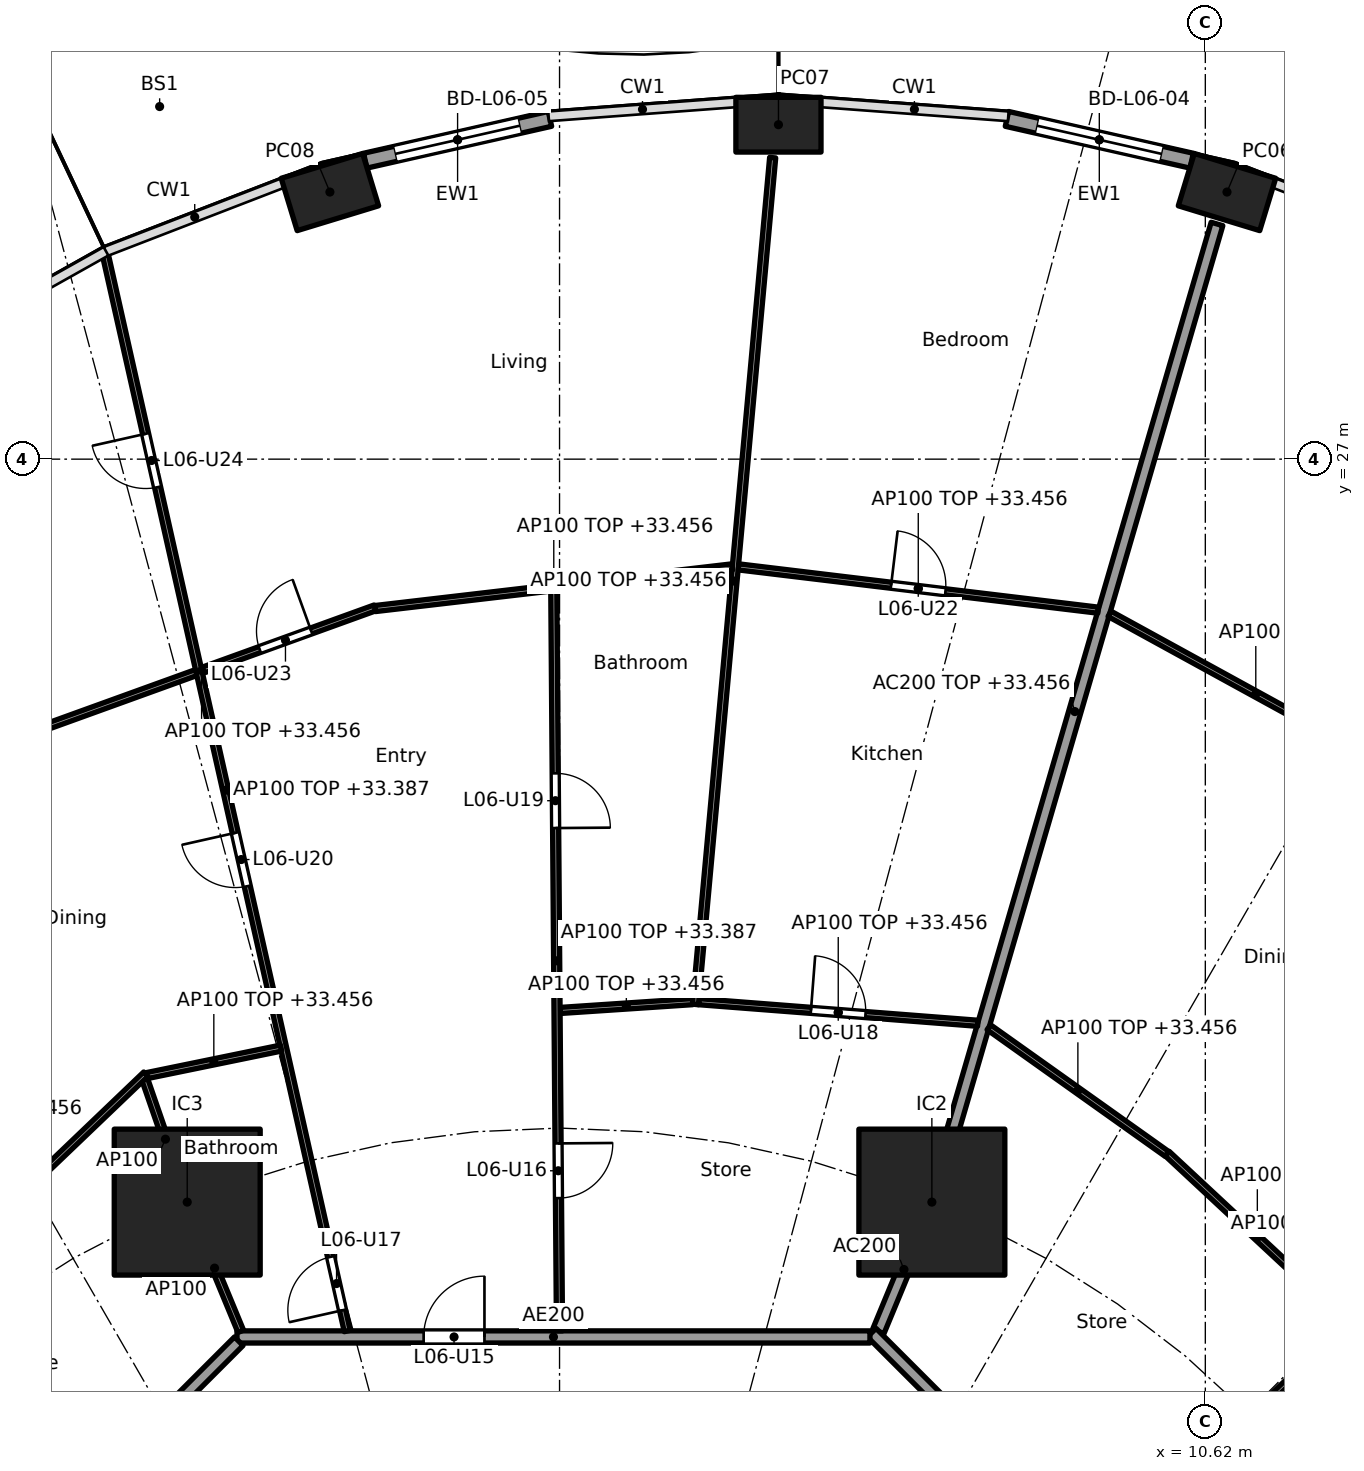
"""IFC4 building model, lengths in metres.
Left out: names, types, materials, properties, quantities, classifications, styles, units other than length and angle.
Written with IfcOpenShell. Run it as: python <this file> out.ifc"""

import sys

from ifc_helpers import new_model, si_unit, direction, frame, frame_2d, origin, origin_2d, place, context, subcontext, project, spatial, rectangle, hollow_rectangle, extrude, element, fill, save


model = new_model("IFC4")
c1 = context("Model", 3, precision=1e-05, world=origin(), true_north=direction((0.0, 1.0)))
c2 = subcontext(c1, "Body", "Model", "MODEL_VIEW")
j1 = project(units=[si_unit("LENGTHUNIT", "METRE"), si_unit("PLANEANGLEUNIT", "RADIAN")], contexts=[c1])
p1 = place(None, origin())
s1 = spatial("IfcSite", under=j1, at=p1, CompositionType="ELEMENT")
p2 = place(p1, origin())
s2 = spatial("IfcBuilding", under=s1, at=p2, CompositionType="ELEMENT")
p3 = place(p2, frame((0.0, 0.0, 30.7)))
s3 = spatial("IfcBuildingStorey", under=s2, at=p3, CompositionType="ELEMENT", Elevation=30.7)
for number, where, z_axis, x_axis in (
    (1, (10.976, 31.393, 0.0), (0.0, 0.0, 1.0), (-0.957, 0.292, 0.0)),
    (2, (3.6, 32.5, 0.0), (0.0, 0.0, 1.0), (-1.0, 0.0, 0.0)),
    (3, (-3.776, 31.393, 0.0), (0.0, 0.0, 1.0), (-0.957, -0.292, 0.0)),
):
    element("IfcColumn", number, at=place(p3, frame(where, z_axis=z_axis, x_axis=x_axis)), inside=s3, PredefinedType="COLUMN", context=c2, shape_type="SweptSolid", body=[
        extrude(hollow_rectangle(XDim=1.4, YDim=0.9, WallThickness=0.05, at=origin_2d()), origin(), (0.0, 0.0, 1.0), 3.7),
    ])
for number, where, z_axis, x_axis in (
    (4, (6.123, 14.782, 0.0), (0.0, 0.0, 1.0), (1.0, 0.0, 0.0)),
    (5, (-6.123, 14.782, 0.0), (0.0, 0.0, 1.0), (1.0, 0.0, 0.0)),
):
    element("IfcColumn", number, at=place(p3, frame(where, z_axis=z_axis, x_axis=x_axis)), inside=s3, PredefinedType="COLUMN", context=c2, shape_type="SweptSolid", body=[
        extrude(rectangle(XDim=2.4, YDim=2.4, at=origin_2d()), origin(), (0.0, 0.0, 1.0), 3.7),
    ])
p4 = place(p3, frame((7.358, 32.596, 0.0), z_axis=(0.0, 0.0, 1.0), x_axis=(0.97533495413, -0.220729987208, 0.0)))
e6 = element("IfcWall", 6, at=p4, inside=s3, PredefinedType="SOLIDWALL", context=c2, shape_type="SweptSolid", body=[
    extrude(rectangle(XDim=3.115, YDim=0.25, at=frame_2d((1.557, 0.0))), origin(), (0.0, 0.0, 1.0), 3.44),
])
p5 = place(p4, frame((0.507, 0.0, 0.0)))
e7 = element("IfcOpeningElement", 7, at=p5, cuts=e6, PredefinedType="OPENING", context=c2, shape_type="SweptSolid", body=[
    extrude(rectangle(XDim=2.1, YDim=2.4, at=frame_2d((1.05, 1.2))), frame((0.0, 0.135, 0.0), z_axis=(0.0, -1.0, 0.0), x_axis=(1.0, 0.0, 0.0)), (0.0, 0.0, 1.0), 0.27),
])
p6 = place(p3, frame((-3.195, 31.908, 0.0), z_axis=(0.0, 0.0, 1.0), x_axis=(0.975331134677, 0.220746863466, 0.0)))
e8 = element("IfcWall", 8, at=p6, inside=s3, PredefinedType="SOLIDWALL", context=c2, shape_type="SweptSolid", body=[
    extrude(rectangle(XDim=3.115, YDim=0.25, at=frame_2d((1.557, 0.0))), origin(), (0.0, 0.0, 1.0), 3.44),
])
p7 = place(p6, frame((0.507, 0.0, 0.0)))
e9 = element("IfcOpeningElement", 9, at=p7, cuts=e8, PredefinedType="OPENING", context=c2, shape_type="SweptSolid", body=[
    extrude(rectangle(XDim=2.1, YDim=2.4, at=frame_2d((1.05, 1.2))), frame((0.0, 0.135, 0.0), z_axis=(0.0, -1.0, 0.0), x_axis=(1.0, 0.0, 0.0)), (0.0, 0.0, 1.0), 0.27),
])
p8 = place(p3, frame((5.243, 12.657, 0.0), z_axis=(0.0, 0.0, 1.0), x_axis=(0.382707856524, 0.923869415315, 0.0)))
e10 = element("IfcWall", 10, at=p8, inside=s3, PredefinedType="PARTITIONING", context=c2, shape_type="SweptSolid", body=[
    extrude(rectangle(XDim=2.2, YDim=0.2, at=frame_2d((1.1, 0.0))), origin(), (0.0, 0.0, 1.0), 3.44),
])
p9 = place(p3, frame((6.137, 14.83, 0.0), z_axis=(0.0, 0.0, 1.0), x_axis=(0.27985745069, 0.960041565399, 0.0)))
e11 = element("IfcWall", 11, at=p9, inside=s3, PredefinedType="PARTITIONING", context=c2, shape_type="SweptSolid", body=[
    extrude(rectangle(XDim=16.705, YDim=0.2, at=frame_2d((8.353, 0.0))), origin(), (0.0, 0.0, 1.0), 2.756),
])
p10 = place(p3, frame((12.635, 5.134, 0.0), z_axis=(0.0, 0.0, 1.0), x_axis=(-0.707106781187, 0.707106781187, 0.0)))
e12 = element("IfcWall", 12, at=p10, inside=s3, PredefinedType="PARTITIONING", context=c2, shape_type="SweptSolid", body=[
    extrude(rectangle(XDim=10.609, YDim=0.2, at=frame_2d((5.305, 0.0))), origin(), (0.0, 0.0, 1.0), 3.44),
])
p11 = place(p10, frame((3.503, 0.0, 0.0)))
e13 = element("IfcOpeningElement", 13, at=p11, cuts=e12, PredefinedType="OPENING", context=c2, shape_type="SweptSolid", body=[
    extrude(rectangle(XDim=1.0, YDim=2.1, at=frame_2d((0.5, 1.05))), frame((0.0, 0.11, 0.0), z_axis=(0.0, -1.0, 0.0), x_axis=(1.0, 0.0, 0.0)), (0.0, 0.0, 1.0), 0.22),
])
p12 = place(p3, frame((5.104, 12.565, 0.0), z_axis=(0.0, 0.0, 1.0), x_axis=(-1.0, 0.0, 0.0)))
e14 = element("IfcWall", 14, at=p12, inside=s3, PredefinedType="PARTITIONING", context=c2, shape_type="SweptSolid", body=[
    extrude(rectangle(XDim=10.409, YDim=0.2, at=frame_2d((5.205, 0.0))), origin(), (0.0, 0.0, 1.0), 3.44),
])
p13 = place(p12, frame((6.339, 0.0, 0.0)))
e15 = element("IfcOpeningElement", 15, at=p13, cuts=e14, PredefinedType="OPENING", context=c2, shape_type="SweptSolid", body=[
    extrude(rectangle(XDim=1.0, YDim=2.1, at=frame_2d((0.5, 1.05))), frame((0.0, 0.11, 0.0), z_axis=(0.0, -1.0, 0.0), x_axis=(1.0, 0.0, 0.0)), (0.0, 0.0, 1.0), 0.22),
])
p14 = place(p3, frame((-5.275, 12.494, 0.0), z_axis=(0.0, 0.0, 1.0), x_axis=(-0.707106781187, -0.707106781187, 0.0)))
e16 = element("IfcWall", 16, at=p14, inside=s3, PredefinedType="PARTITIONING", context=c2, shape_type="SweptSolid", body=[
    extrude(rectangle(XDim=10.209, YDim=0.2, at=frame_2d((5.104, 0.0))), origin(), (0.0, 0.0, 1.0), 3.44),
])
p15 = place(p3, frame((10.813, 7.091, 0.0), z_axis=(0.0, 0.0, 1.0), x_axis=(0.885182649479, 0.465243674928, 0.0)))
e17 = element("IfcWall", 17, at=p15, inside=s3, PredefinedType="PARTITIONING", context=c2, shape_type="SweptSolid", body=[
    extrude(rectangle(XDim=12.551, YDim=0.1, at=frame_2d((6.275, 0.0))), origin(), (0.0, 0.0, 1.0), 2.687),
])
p16 = place(p15, frame((0.539, 0.0, 0.0)))
e18 = element("IfcOpeningElement", 18, at=p16, cuts=e17, PredefinedType="OPENING", context=c2, shape_type="SweptSolid", body=[
    extrude(rectangle(XDim=0.9, YDim=2.1, at=frame_2d((0.45, 1.05))), frame((0.0, 0.06, 0.0), z_axis=(0.0, -1.0, 0.0), x_axis=(1.0, 0.0, 0.0)), (0.0, 0.0, 1.0), 0.12),
])
p17 = place(p15, frame((8.494, 0.0, 0.0)))
e19 = element("IfcOpeningElement", 19, at=p17, cuts=e17, PredefinedType="OPENING", context=c2, shape_type="SweptSolid", body=[
    extrude(rectangle(XDim=0.9, YDim=2.1, at=frame_2d((0.45, 1.05))), frame((0.0, 0.06, 0.0), z_axis=(0.0, -1.0, 0.0), x_axis=(1.0, 0.0, 0.0)), (0.0, 0.0, 1.0), 0.12),
])
p18 = place(p3, frame((8.957, 8.953, 0.0), z_axis=(0.0, 0.0, 1.0), x_axis=(0.725250022034, 0.688485588476, 0.0)))
e20 = element("IfcWall", 20, at=p18, inside=s3, PredefinedType="PARTITIONING", context=c2, shape_type="SweptSolid", body=[
    extrude(rectangle(XDim=12.963, YDim=0.1, at=frame_2d((6.481, 0.0))), origin(), (0.0, 0.0, 1.0), 2.687),
])
p19 = place(p18, frame((2.333, 0.0, 0.0)))
e21 = element("IfcOpeningElement", 21, at=p19, cuts=e20, PredefinedType="OPENING", context=c2, shape_type="SweptSolid", body=[
    extrude(rectangle(XDim=0.9, YDim=2.1, at=frame_2d((0.45, 1.05))), frame((0.0, 0.06, 0.0), z_axis=(0.0, -1.0, 0.0), x_axis=(1.0, 0.0, 0.0)), (0.0, 0.0, 1.0), 0.12),
])
p20 = place(p18, frame((8.79, 0.0, 0.0)))
e22 = element("IfcOpeningElement", 22, at=p20, cuts=e20, PredefinedType="OPENING", context=c2, shape_type="SweptSolid", body=[
    extrude(rectangle(XDim=0.9, YDim=2.1, at=frame_2d((0.45, 1.05))), frame((0.0, 0.06, 0.0), z_axis=(0.0, -1.0, 0.0), x_axis=(1.0, 0.0, 0.0)), (0.0, 0.0, 1.0), 0.12),
])
p21 = place(p3, frame((12.958, 12.82, 0.0), z_axis=(0.0, 0.0, 1.0), x_axis=(-0.732028724098, 0.681273768096, 0.0)))
e23 = element("IfcWall", 23, at=p21, inside=s3, PredefinedType="PARTITIONING", context=c2, shape_type="SweptSolid", body=[
    extrude(rectangle(XDim=4.05, YDim=0.1, at=frame_2d((2.025, 0.0))), origin(), (0.0, 0.0, 1.0), 2.756),
])
p22 = place(p3, frame((9.989, 15.574, 0.0), z_axis=(0.0, 0.0, 1.0), x_axis=(-0.81492039338, 0.57957290521, 0.0)))
e24 = element("IfcWall", 24, at=p22, inside=s3, PredefinedType="PARTITIONING", context=c2, shape_type="SweptSolid", body=[
    extrude(rectangle(XDim=3.594, YDim=0.1, at=frame_2d((1.797, 0.0))), origin(), (0.0, 0.0, 1.0), 2.756),
])
p23 = place(p3, frame((13.855, 21.818, 0.0), z_axis=(0.0, 0.0, 1.0), x_axis=(-0.876809987787, 0.480837025734, 0.0)))
e25 = element("IfcWall", 25, at=p23, inside=s3, PredefinedType="PARTITIONING", context=c2, shape_type="SweptSolid", body=[
    extrude(rectangle(XDim=5.486, YDim=0.1, at=frame_2d((2.743, 0.0))), origin(), (0.0, 0.0, 1.0), 2.756),
])
p24 = place(p3, frame((6.878, 17.723, 0.0), z_axis=(0.0, 0.0, 1.0), x_axis=(-0.99701850123, 0.077162868047, 0.0)))
e26 = element("IfcWall", 26, at=p24, inside=s3, PredefinedType="PARTITIONING", context=c2, shape_type="SweptSolid", body=[
    extrude(rectangle(XDim=4.604, YDim=0.1, at=frame_2d((2.302, 0.0))), origin(), (0.0, 0.0, 1.0), 2.756),
])
p25 = place(p24, frame((1.852, 0.0, 0.0)))
e27 = element("IfcOpeningElement", 27, at=p25, cuts=e26, PredefinedType="OPENING", context=c2, shape_type="SweptSolid", body=[
    extrude(rectangle(XDim=0.9, YDim=2.1, at=frame_2d((0.45, 1.05))), frame((0.0, 0.06, 0.0), z_axis=(0.0, -1.0, 0.0), x_axis=(1.0, 0.0, 0.0)), (0.0, 0.0, 1.0), 0.12),
])
p26 = place(p3, frame((8.858, 24.516, 0.0), z_axis=(0.0, 0.0, 1.0), x_axis=(-0.992834127896, 0.119500604542, 0.0)))
e28 = element("IfcWall", 28, at=p26, inside=s3, PredefinedType="PARTITIONING", context=c2, shape_type="SweptSolid", body=[
    extrude(rectangle(XDim=5.959, YDim=0.1, at=frame_2d((2.98, 0.0))), origin(), (0.0, 0.0, 1.0), 2.756),
])
p27 = place(p26, frame((2.53, 0.0, 0.0)))
e29 = element("IfcOpeningElement", 29, at=p27, cuts=e28, PredefinedType="OPENING", context=c2, shape_type="SweptSolid", body=[
    extrude(rectangle(XDim=0.9, YDim=2.1, at=frame_2d((0.45, 1.05))), frame((0.0, 0.06, 0.0), z_axis=(0.0, -1.0, 0.0), x_axis=(1.0, 0.0, 0.0)), (0.0, 0.0, 1.0), 0.12),
])
p28 = place(p3, frame((2.234, 18.032, 0.0), z_axis=(0.0, 0.0, 1.0), x_axis=(0.090891502968, 0.995860800859, 0.0)))
e30 = element("IfcWall", 30, at=p28, inside=s3, PredefinedType="PARTITIONING", context=c2, shape_type="SweptSolid", body=[
    extrude(rectangle(XDim=13.984, YDim=0.1, at=frame_2d((6.992, 0.0))), origin(), (0.0, 0.0, 1.0), 2.756),
])
p29 = place(p3, frame((2.188, 18.079, 0.0), z_axis=(0.0, 0.0, 1.0), x_axis=(-0.997794542617, -0.066378089183, 0.0)))
e31 = element("IfcWall", 31, at=p29, inside=s3, PredefinedType="PARTITIONING", context=c2, shape_type="SweptSolid", body=[
    extrude(rectangle(XDim=2.185, YDim=0.1, at=frame_2d((1.092, 0.0))), origin(), (0.0, 0.0, 1.0), 2.756),
])
p30 = place(p3, frame((2.842, 25.229, 0.0), z_axis=(0.0, 0.0, 1.0), x_axis=(-0.993255612046, -0.115945198862, 0.0)))
e32 = element("IfcWall", 32, at=p30, inside=s3, PredefinedType="PARTITIONING", context=c2, shape_type="SweptSolid", body=[
    extrude(rectangle(XDim=5.913, YDim=0.1, at=frame_2d((2.956, 0.0))), origin(), (0.0, 0.0, 1.0), 2.756),
])
p31 = place(p3, frame((-0.001, 12.665, 0.0), z_axis=(0.0, 0.0, 1.0), x_axis=(-0.007702417287, 0.999970335944, 0.0)))
e33 = element("IfcWall", 33, at=p31, inside=s3, PredefinedType="PARTITIONING", context=c2, shape_type="SweptSolid", body=[
    extrude(rectangle(XDim=12.171, YDim=0.1, at=frame_2d((6.086, 0.0))), origin(), (0.0, 0.0, 1.0), 2.687),
])
p32 = place(p31, frame((2.183, 0.0, 0.0)))
e34 = element("IfcOpeningElement", 34, at=p32, cuts=e33, PredefinedType="OPENING", context=c2, shape_type="SweptSolid", body=[
    extrude(rectangle(XDim=0.9, YDim=2.1, at=frame_2d((0.45, 1.05))), frame((0.0, 0.06, 0.0), z_axis=(0.0, -1.0, 0.0), x_axis=(1.0, 0.0, 0.0)), (0.0, 0.0, 1.0), 0.12),
])
p33 = place(p31, frame((8.269, 0.0, 0.0)))
e35 = element("IfcOpeningElement", 35, at=p33, cuts=e33, PredefinedType="OPENING", context=c2, shape_type="SweptSolid", body=[
    extrude(rectangle(XDim=0.9, YDim=2.1, at=frame_2d((0.45, 1.05))), frame((0.0, 0.06, 0.0), z_axis=(0.0, -1.0, 0.0), x_axis=(1.0, 0.0, 0.0)), (0.0, 0.0, 1.0), 0.12),
])
p34 = place(p3, frame((-3.034, 24.554, 0.0), z_axis=(0.0, 0.0, 1.0), x_axis=(-0.940401691072, -0.340065669288, 0.0)))
e36 = element("IfcWall", 36, at=p34, inside=s3, PredefinedType="PARTITIONING", context=c2, shape_type="SweptSolid", body=[
    extrude(rectangle(XDim=6.067, YDim=0.1, at=frame_2d((3.034, 0.0))), origin(), (0.0, 0.0, 1.0), 2.756),
])
p35 = place(p34, frame((1.117, 0.0, 0.0)))
e37 = element("IfcOpeningElement", 37, at=p35, cuts=e36, PredefinedType="OPENING", context=c2, shape_type="SweptSolid", body=[
    extrude(rectangle(XDim=0.9, YDim=2.1, at=frame_2d((0.45, 1.05))), frame((0.0, 0.06, 0.0), z_axis=(0.0, -1.0, 0.0), x_axis=(1.0, 0.0, 0.0)), (0.0, 0.0, 1.0), 0.12),
])
p36 = place(p3, frame((-3.492, 12.662, 0.0), z_axis=(0.0, 0.0, 1.0), x_axis=(-0.219268088006, 0.975664648115, 0.0)))
e38 = element("IfcWall", 38, at=p36, inside=s3, PredefinedType="PARTITIONING", context=c2, shape_type="SweptSolid", body=[
    extrude(rectangle(XDim=18.23, YDim=0.1, at=frame_2d((9.115, 0.0))), origin(), (0.0, 0.0, 1.0), 2.687),
])
p37 = place(p36, frame((0.35, 0.0, 0.0)))
e39 = element("IfcOpeningElement", 39, at=p37, cuts=e38, PredefinedType="OPENING", context=c2, shape_type="SweptSolid", body=[
    extrude(rectangle(XDim=0.9, YDim=2.1, at=frame_2d((0.45, 1.05))), frame((0.0, 0.06, 0.0), z_axis=(0.0, -1.0, 0.0), x_axis=(1.0, 0.0, 0.0)), (0.0, 0.0, 1.0), 0.12),
])
p38 = place(p36, frame((7.497, 0.0, 0.0)))
e40 = element("IfcOpeningElement", 40, at=p38, cuts=e38, PredefinedType="OPENING", context=c2, shape_type="SweptSolid", body=[
    extrude(rectangle(XDim=0.9, YDim=2.1, at=frame_2d((0.45, 1.05))), frame((0.0, 0.06, 0.0), z_axis=(0.0, -1.0, 0.0), x_axis=(1.0, 0.0, 0.0)), (0.0, 0.0, 1.0), 0.12),
])
p39 = place(p36, frame((14.223, 0.0, 0.0)))
e41 = element("IfcOpeningElement", 41, at=p39, cuts=e38, PredefinedType="OPENING", context=c2, shape_type="SweptSolid", body=[
    extrude(rectangle(XDim=0.9, YDim=2.1, at=frame_2d((0.45, 1.05))), frame((0.0, 0.06, 0.0), z_axis=(0.0, -1.0, 0.0), x_axis=(1.0, 0.0, 0.0)), (0.0, 0.0, 1.0), 0.12),
])
p40 = place(p3, frame((-4.58, 17.315, 0.0), z_axis=(0.0, 0.0, 1.0), x_axis=(-0.979581941859, -0.201045316246, 0.0)))
e42 = element("IfcWall", 42, at=p40, inside=s3, PredefinedType="PARTITIONING", context=c2, shape_type="SweptSolid", body=[
    extrude(rectangle(XDim=2.256, YDim=0.1, at=frame_2d((1.128, 0.0))), origin(), (0.0, 0.0, 1.0), 2.756),
])
p41 = place(p3, frame((-5.243, 12.657, 0.0), z_axis=(0.0, 0.0, 1.0), x_axis=(-0.382719158442, 0.923864733477, 0.0)))
e43 = element("IfcWall", 43, at=p41, inside=s3, PredefinedType="PARTITIONING", context=c2, shape_type="SweptSolid", body=[
    extrude(rectangle(XDim=2.25, YDim=0.1, at=frame_2d((1.125, 0.0))), origin(), (0.0, 0.0, 1.0), 3.44),
])
p42 = place(p3, frame((-6.139, 14.83, 0.0), z_axis=(0.0, 0.0, 1.0), x_axis=(-0.327246993321, 0.944938836837, 0.0)))
e44 = element("IfcWall", 44, at=p42, inside=s3, PredefinedType="PARTITIONING", context=c2, shape_type="SweptSolid", body=[
    extrude(rectangle(XDim=2.09, YDim=0.1, at=frame_2d((1.045, 0.0))), origin(), (0.0, 0.0, 1.0), 3.44),
])
p43 = place(p3, frame((-6.803, 16.886, 0.0), z_axis=(0.0, 0.0, 1.0), x_axis=(-0.722763212502, -0.69109575216, 0.0)))
e45 = element("IfcWall", 45, at=p43, inside=s3, PredefinedType="PARTITIONING", context=c2, shape_type="SweptSolid", body=[
    extrude(rectangle(XDim=4.587, YDim=0.1, at=frame_2d((2.293, 0.0))), origin(), (0.0, 0.0, 1.0), 2.756),
])
p44 = place(p43, frame((2.75, 0.0, 0.0)))
e46 = element("IfcOpeningElement", 46, at=p44, cuts=e45, PredefinedType="OPENING", context=c2, shape_type="SweptSolid", body=[
    extrude(rectangle(XDim=0.9, YDim=2.1, at=frame_2d((0.45, 1.05))), frame((0.0, 0.06, 0.0), z_axis=(0.0, -1.0, 0.0), x_axis=(1.0, 0.0, 0.0)), (0.0, 0.0, 1.0), 0.12),
])
p45 = place(p5, origin())
e47 = element("IfcDoor", 47, at=p45, inside=s3, OperationType="SLIDING_TO_LEFT", PredefinedType="DOOR", context=c2, shape_type="SweptSolid", body=[
    extrude(rectangle(XDim=2.1, YDim=2.4, at=frame_2d((1.05, 1.2))), frame((0.0, 0.025, 0.0), z_axis=(0.0, -1.0, 0.0), x_axis=(1.0, 0.0, 0.0)), (0.0, 0.0, 1.0), 0.05),
])
fill(e7, e47)
p46 = place(p7, origin())
e48 = element("IfcDoor", 48, at=p46, inside=s3, OperationType="SLIDING_TO_LEFT", PredefinedType="DOOR", context=c2, shape_type="SweptSolid", body=[
    extrude(rectangle(XDim=2.1, YDim=2.4, at=frame_2d((1.05, 1.2))), frame((0.0, 0.025, 0.0), z_axis=(0.0, -1.0, 0.0), x_axis=(1.0, 0.0, 0.0)), (0.0, 0.0, 1.0), 0.05),
])
fill(e9, e48)
p47 = place(p13, frame((1.0, 0.0, 0.0), x_axis=(-1.0, 0.0, 0.0)))
e49 = element("IfcDoor", 49, at=p47, inside=s3, OperationType="SINGLE_SWING_RIGHT", PredefinedType="DOOR", context=c2, shape_type="SweptSolid", body=[
    extrude(rectangle(XDim=1.0, YDim=2.1, at=frame_2d((0.5, 1.05))), frame((0.0, 0.025, 0.0), z_axis=(0.0, -1.0, 0.0), x_axis=(1.0, 0.0, 0.0)), (0.0, 0.0, 1.0), 0.05),
])
fill(e15, e49)
p48 = place(p32, frame((0.9, 0.0, 0.0), x_axis=(-1.0, 0.0, 0.0)))
e50 = element("IfcDoor", 50, at=p48, inside=s3, OperationType="SINGLE_SWING_LEFT", PredefinedType="DOOR", context=c2, shape_type="SweptSolid", body=[
    extrude(rectangle(XDim=0.9, YDim=2.1, at=frame_2d((0.45, 1.05))), frame((0.0, 0.025, 0.0), z_axis=(0.0, -1.0, 0.0), x_axis=(1.0, 0.0, 0.0)), (0.0, 0.0, 1.0), 0.05),
])
fill(e34, e50)
p49 = place(p37, origin())
e51 = element("IfcDoor", 51, at=p49, inside=s3, OperationType="SINGLE_SWING_LEFT", PredefinedType="DOOR", context=c2, shape_type="SweptSolid", body=[
    extrude(rectangle(XDim=0.9, YDim=2.1, at=frame_2d((0.45, 1.05))), frame((0.0, 0.025, 0.0), z_axis=(0.0, -1.0, 0.0), x_axis=(1.0, 0.0, 0.0)), (0.0, 0.0, 1.0), 0.05),
])
fill(e39, e51)
p50 = place(p25, frame((0.9, 0.0, 0.0), x_axis=(-1.0, 0.0, 0.0)))
e52 = element("IfcDoor", 52, at=p50, inside=s3, OperationType="SINGLE_SWING_LEFT", PredefinedType="DOOR", context=c2, shape_type="SweptSolid", body=[
    extrude(rectangle(XDim=0.9, YDim=2.1, at=frame_2d((0.45, 1.05))), frame((0.0, 0.025, 0.0), z_axis=(0.0, -1.0, 0.0), x_axis=(1.0, 0.0, 0.0)), (0.0, 0.0, 1.0), 0.05),
])
fill(e27, e52)
p51 = place(p33, frame((0.9, 0.0, 0.0), x_axis=(-1.0, 0.0, 0.0)))
e53 = element("IfcDoor", 53, at=p51, inside=s3, OperationType="SINGLE_SWING_RIGHT", PredefinedType="DOOR", context=c2, shape_type="SweptSolid", body=[
    extrude(rectangle(XDim=0.9, YDim=2.1, at=frame_2d((0.45, 1.05))), frame((0.0, 0.025, 0.0), z_axis=(0.0, -1.0, 0.0), x_axis=(1.0, 0.0, 0.0)), (0.0, 0.0, 1.0), 0.05),
])
fill(e35, e53)
p52 = place(p38, origin())
e54 = element("IfcDoor", 54, at=p52, inside=s3, OperationType="SINGLE_SWING_RIGHT", PredefinedType="DOOR", context=c2, shape_type="SweptSolid", body=[
    extrude(rectangle(XDim=0.9, YDim=2.1, at=frame_2d((0.45, 1.05))), frame((0.0, 0.025, 0.0), z_axis=(0.0, -1.0, 0.0), x_axis=(1.0, 0.0, 0.0)), (0.0, 0.0, 1.0), 0.05),
])
fill(e40, e54)
p53 = place(p27, frame((0.9, 0.0, 0.0), x_axis=(-1.0, 0.0, 0.0)))
e55 = element("IfcDoor", 55, at=p53, inside=s3, OperationType="SINGLE_SWING_LEFT", PredefinedType="DOOR", context=c2, shape_type="SweptSolid", body=[
    extrude(rectangle(XDim=0.9, YDim=2.1, at=frame_2d((0.45, 1.05))), frame((0.0, 0.025, 0.0), z_axis=(0.0, -1.0, 0.0), x_axis=(1.0, 0.0, 0.0)), (0.0, 0.0, 1.0), 0.05),
])
fill(e29, e55)
p54 = place(p35, frame((0.9, 0.0, 0.0), x_axis=(-1.0, 0.0, 0.0)))
e56 = element("IfcDoor", 56, at=p54, inside=s3, OperationType="SINGLE_SWING_RIGHT", PredefinedType="DOOR", context=c2, shape_type="SweptSolid", body=[
    extrude(rectangle(XDim=0.9, YDim=2.1, at=frame_2d((0.45, 1.05))), frame((0.0, 0.025, 0.0), z_axis=(0.0, -1.0, 0.0), x_axis=(1.0, 0.0, 0.0)), (0.0, 0.0, 1.0), 0.05),
])
fill(e37, e56)
p55 = place(p39, origin())
e57 = element("IfcDoor", 57, at=p55, inside=s3, OperationType="SINGLE_SWING_RIGHT", PredefinedType="DOOR", context=c2, shape_type="SweptSolid", body=[
    extrude(rectangle(XDim=0.9, YDim=2.1, at=frame_2d((0.45, 1.05))), frame((0.0, 0.025, 0.0), z_axis=(0.0, -1.0, 0.0), x_axis=(1.0, 0.0, 0.0)), (0.0, 0.0, 1.0), 0.05),
])
fill(e41, e57)
save(model, sys.argv[1])
